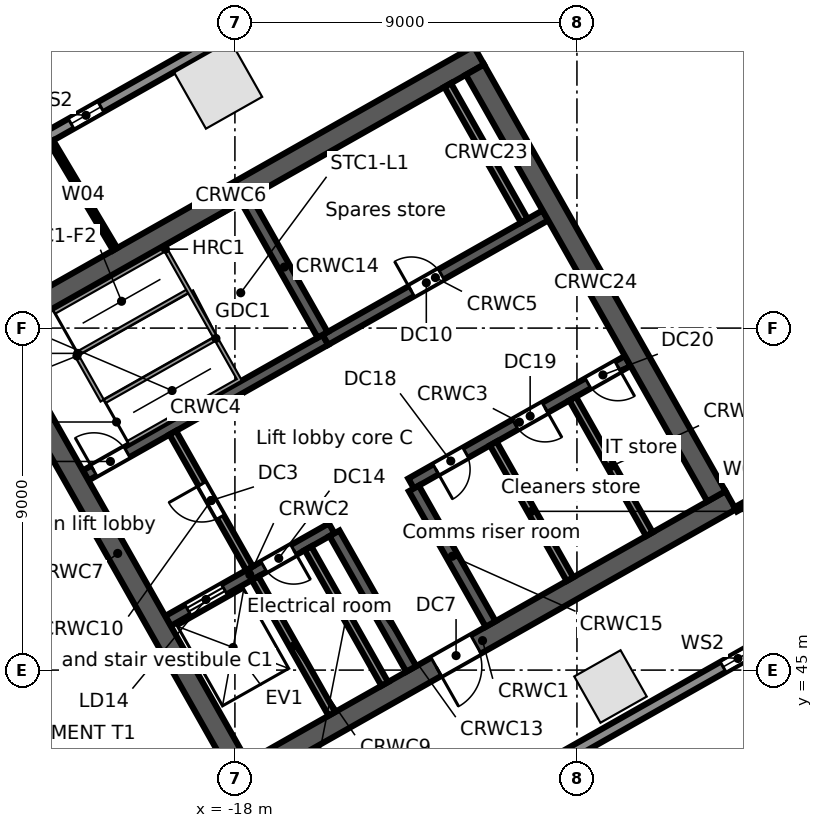
"""IFC4 building model, lengths in metres.
Left out: names, types, materials, properties, quantities, classifications, styles, units other than length and angle.
Written with IfcOpenShell. Run it as: python <this file> out.ifc"""

import sys

from ifc_helpers import new_model, si_unit, direction, frame, frame_2d, origin, origin_2d, place, context, subcontext, project, spatial, rectangle, extrude, element, fill, save


model = new_model("IFC4")
c1 = context("Model", 3, precision=1e-05, world=origin(), true_north=direction((0.0, 1.0)))
c2 = subcontext(c1, "Body", "Model", "MODEL_VIEW")
j1 = project(units=[si_unit("LENGTHUNIT", "METRE"), si_unit("PLANEANGLEUNIT", "RADIAN")], contexts=[c1])
p1 = place(None, origin())
s1 = spatial("IfcSite", under=j1, at=p1, CompositionType="ELEMENT")
p2 = place(p1, origin())
s2 = spatial("IfcBuilding", under=s1, at=p2, CompositionType="ELEMENT")
p3 = place(p2, frame((0.0, 0.0, 145.5)))
s3 = spatial("IfcBuildingStorey", under=s2, at=p3, CompositionType="ELEMENT", Elevation=145.5)
p4 = place(p3, frame((-18.441, 60.406, 0.0), z_axis=(0.0, 0.0, 1.0), x_axis=(-0.87035569594, -0.492423560103, 0.0)))
e1 = element("IfcColumn", 1, at=p4, inside=s3, PredefinedType="COLUMN", context=c2, shape_type="SweptSolid", body=[
    extrude(rectangle(XDim=1.7, YDim=1.7, at=origin_2d()), origin(), (0.0, 0.0, 1.0), 4.4),
])
p5 = place(p3, frame((-8.117, 44.568, 0.0), z_axis=(0.0, 0.0, 1.0), x_axis=(0.87035569594, 0.492423560103, 0.0)))
e2 = element("IfcColumn", 2, at=p5, inside=s3, PredefinedType="COLUMN", context=c2, shape_type="SweptSolid", body=[
    extrude(rectangle(XDim=1.4, YDim=1.4, at=origin_2d()), origin(), (0.0, 0.0, 1.0), 4.4),
])
p6 = place(p3, frame((-58.745, 38.764, 0.0), z_axis=(0.0, 0.0, 1.0), x_axis=(0.870355811726, 0.492423355453, 0.0)))
e3 = element("IfcWall", 3, at=p6, inside=s3, PredefinedType="STANDARD", context=c2, shape_type="SweptSolid", body=[
    extrude(rectangle(XDim=64.025, YDim=0.3, at=frame_2d((32.013, 0.0))), origin(), (0.0, 0.0, 1.0), 4.05),
])
p7 = place(p6, frame((60.122, 0.0, 0.6)))
e4 = element("IfcOpeningElement", 4, at=p7, cuts=e3, PredefinedType="OPENING", context=c2, shape_type="SweptSolid", body=[
    extrude(rectangle(XDim=0.9, YDim=2.8, at=frame_2d((0.45, 1.4))), frame((0.0, 0.16, 0.0), z_axis=(0.0, -1.0, 0.0), x_axis=(1.0, 0.0, 0.0)), (0.0, 0.0, 1.0), 0.32),
])
p8 = place(p6, frame((50.992, 0.0, 0.6)))
e5 = element("IfcOpeningElement", 5, at=p8, cuts=e3, PredefinedType="OPENING", context=c2, shape_type="SweptSolid", body=[
    extrude(rectangle(XDim=0.9, YDim=2.8, at=frame_2d((0.45, 1.4))), frame((0.0, 0.16, 0.0), z_axis=(0.0, -1.0, 0.0), x_axis=(1.0, 0.0, 0.0)), (0.0, 0.0, 1.0), 0.32),
])
p9 = place(p6, frame((41.862, 0.0, 0.6)))
e6 = element("IfcOpeningElement", 6, at=p9, cuts=e3, PredefinedType="OPENING", context=c2, shape_type="SweptSolid", body=[
    extrude(rectangle(XDim=0.9, YDim=2.8, at=frame_2d((0.45, 1.4))), frame((0.0, 0.16, 0.0), z_axis=(0.0, -1.0, 0.0), x_axis=(1.0, 0.0, 0.0)), (0.0, 0.0, 1.0), 0.32),
])
p10 = place(p6, frame((32.732, 0.0, 0.6)))
e7 = element("IfcOpeningElement", 7, at=p10, cuts=e3, PredefinedType="OPENING", context=c2, shape_type="SweptSolid", body=[
    extrude(rectangle(XDim=0.9, YDim=2.8, at=frame_2d((0.45, 1.4))), frame((0.0, 0.16, 0.0), z_axis=(0.0, -1.0, 0.0), x_axis=(1.0, 0.0, 0.0)), (0.0, 0.0, 1.0), 0.32),
])
p11 = place(p6, frame((23.602, 0.0, 0.6)))
e8 = element("IfcOpeningElement", 8, at=p11, cuts=e3, PredefinedType="OPENING", context=c2, shape_type="SweptSolid", body=[
    extrude(rectangle(XDim=0.9, YDim=2.8, at=frame_2d((0.45, 1.4))), frame((0.0, 0.16, 0.0), z_axis=(0.0, -1.0, 0.0), x_axis=(1.0, 0.0, 0.0)), (0.0, 0.0, 1.0), 0.32),
])
p12 = place(p6, frame((14.472, 0.0, 0.6)))
e9 = element("IfcOpeningElement", 9, at=p12, cuts=e3, PredefinedType="OPENING", context=c2, shape_type="SweptSolid", body=[
    extrude(rectangle(XDim=0.9, YDim=2.8, at=frame_2d((0.45, 1.4))), frame((0.0, 0.16, 0.0), z_axis=(0.0, -1.0, 0.0), x_axis=(1.0, 0.0, 0.0)), (0.0, 0.0, 1.0), 0.32),
])
p13 = place(p6, frame((5.342, 0.0, 0.6)))
e10 = element("IfcOpeningElement", 10, at=p13, cuts=e3, PredefinedType="OPENING", context=c2, shape_type="SweptSolid", body=[
    extrude(rectangle(XDim=0.9, YDim=2.8, at=frame_2d((0.45, 1.4))), frame((0.0, 0.16, 0.0), z_axis=(0.0, -1.0, 0.0), x_axis=(1.0, 0.0, 0.0)), (0.0, 0.0, 1.0), 0.32),
])
p14 = place(p3, frame((-0.055, 47.969, 0.0), z_axis=(0.0, 0.0, 1.0), x_axis=(-0.870355730478, -0.492423499058, 0.0)))
e11 = element("IfcWall", 11, at=p14, inside=s3, PredefinedType="STANDARD", context=c2, shape_type="SweptSolid", body=[
    extrude(rectangle(XDim=43.75, YDim=0.3, at=frame_2d((21.875, 0.0))), origin(), (0.0, 0.0, 1.0), 4.05),
])
p15 = place(p14, frame((39.977, 0.0, 0.6)))
e12 = element("IfcOpeningElement", 12, at=p15, cuts=e11, PredefinedType="OPENING", context=c2, shape_type="SweptSolid", body=[
    extrude(rectangle(XDim=0.9, YDim=2.8, at=frame_2d((0.45, 1.4))), frame((0.0, 0.16, 0.0), z_axis=(0.0, -1.0, 0.0), x_axis=(1.0, 0.0, 0.0)), (0.0, 0.0, 1.0), 0.32),
])
p16 = place(p14, frame((31.222, 0.0, 0.6)))
e13 = element("IfcOpeningElement", 13, at=p16, cuts=e11, PredefinedType="OPENING", context=c2, shape_type="SweptSolid", body=[
    extrude(rectangle(XDim=0.9, YDim=2.8, at=frame_2d((0.45, 1.4))), frame((0.0, 0.16, 0.0), z_axis=(0.0, -1.0, 0.0), x_axis=(1.0, 0.0, 0.0)), (0.0, 0.0, 1.0), 0.32),
])
p17 = place(p14, frame((22.468, 0.0, 0.6)))
e14 = element("IfcOpeningElement", 14, at=p17, cuts=e11, PredefinedType="OPENING", context=c2, shape_type="SweptSolid", body=[
    extrude(rectangle(XDim=0.9, YDim=2.8, at=frame_2d((0.45, 1.4))), frame((0.0, 0.16, 0.0), z_axis=(0.0, -1.0, 0.0), x_axis=(1.0, 0.0, 0.0)), (0.0, 0.0, 1.0), 0.32),
])
p18 = place(p14, frame((13.713, 0.0, 0.6)))
e15 = element("IfcOpeningElement", 15, at=p18, cuts=e11, PredefinedType="OPENING", context=c2, shape_type="SweptSolid", body=[
    extrude(rectangle(XDim=0.9, YDim=2.8, at=frame_2d((0.45, 1.4))), frame((0.0, 0.16, 0.0), z_axis=(0.0, -1.0, 0.0), x_axis=(1.0, 0.0, 0.0)), (0.0, 0.0, 1.0), 0.32),
])
p19 = place(p14, frame((4.959, 0.0, 0.6)))
e16 = element("IfcOpeningElement", 16, at=p19, cuts=e11, PredefinedType="OPENING", context=c2, shape_type="SweptSolid", body=[
    extrude(rectangle(XDim=0.9, YDim=2.8, at=frame_2d((0.45, 1.4))), frame((0.0, 0.16, 0.0), z_axis=(0.0, -1.0, 0.0), x_axis=(1.0, 0.0, 0.0)), (0.0, 0.0, 1.0), 0.32),
])
p20 = place(p3, frame((-18.012, 42.083, 0.0), z_axis=(0.0, 0.0, 1.0), x_axis=(0.870360574057, 0.492414937962, 0.0)))
e17 = element("IfcWall", 17, at=p20, inside=s3, PredefinedType="SOLIDWALL", context=c2, shape_type="SweptSolid", body=[
    extrude(rectangle(XDim=15.0, YDim=0.55, at=frame_2d((7.5, 0.0))), origin(), (0.0, 0.0, 1.0), 4.05),
])
p21 = place(p20, frame((6.1, 0.0, 0.0)))
e18 = element("IfcOpeningElement", 18, at=p21, cuts=e17, PredefinedType="OPENING", context=c2, shape_type="SweptSolid", body=[
    extrude(rectangle(XDim=1.2, YDim=2.1, at=frame_2d((0.6, 1.05))), frame((0.0, 0.285, 0.0), z_axis=(0.0, -1.0, 0.0), x_axis=(1.0, 0.0, 0.0)), (0.0, 0.0, 1.0), 0.57),
])
p22 = place(p3, frame((-19.762, 46.292, 0.0), z_axis=(0.0, 0.0, 1.0), x_axis=(0.870359758983, 0.49241637863, 0.0)))
e19 = element("IfcWall", 19, at=p22, inside=s3, PredefinedType="SOLIDWALL", context=c2, shape_type="SweptSolid", body=[
    extrude(rectangle(XDim=4.95, YDim=0.3, at=frame_2d((2.475, 0.0))), origin(), (0.0, 0.0, 1.0), 4.05),
])
p23 = place(p22, frame((0.6, 0.0, 0.0)))
e20 = element("IfcOpeningElement", 20, at=p23, cuts=e19, PredefinedType="OPENING", context=c2, shape_type="SweptSolid", body=[
    extrude(rectangle(XDim=1.1, YDim=2.1, at=frame_2d((0.55, 1.05))), frame((0.0, 0.16, 0.0), z_axis=(0.0, -1.0, 0.0), x_axis=(1.0, 0.0, 0.0)), (0.0, 0.0, 1.0), 0.32),
])
p24 = place(p22, frame((2.9, 0.0, 0.0)))
e21 = element("IfcOpeningElement", 21, at=p24, cuts=e19, PredefinedType="OPENING", context=c2, shape_type="SweptSolid", body=[
    extrude(rectangle(XDim=0.9, YDim=2.1, at=frame_2d((0.45, 1.05))), frame((0.0, 0.16, 0.0), z_axis=(0.0, -1.0, 0.0), x_axis=(1.0, 0.0, 0.0)), (0.0, 0.0, 1.0), 0.32),
])
p25 = place(p3, frame((-13.365, 49.911, 0.0), z_axis=(0.0, 0.0, 1.0), x_axis=(0.870336435567, 0.492457601144, 0.0)))
e22 = element("IfcWall", 22, at=p25, inside=s3, PredefinedType="SOLIDWALL", context=c2, shape_type="SweptSolid", body=[
    extrude(rectangle(XDim=6.55, YDim=0.3, at=frame_2d((3.275, 0.0))), origin(), (0.0, 0.0, 1.0), 4.05),
])
p26 = place(p25, frame((0.75, 0.0, 0.0)))
e23 = element("IfcOpeningElement", 23, at=p26, cuts=e22, PredefinedType="OPENING", context=c2, shape_type="SweptSolid", body=[
    extrude(rectangle(XDim=0.9, YDim=2.1, at=frame_2d((0.45, 1.05))), frame((0.0, 0.16, 0.0), z_axis=(0.0, -1.0, 0.0), x_axis=(1.0, 0.0, 0.0)), (0.0, 0.0, 1.0), 0.32),
])
p27 = place(p25, frame((3.15, 0.0, 0.0)))
e24 = element("IfcOpeningElement", 24, at=p27, cuts=e22, PredefinedType="OPENING", context=c2, shape_type="SweptSolid", body=[
    extrude(rectangle(XDim=0.9, YDim=2.1, at=frame_2d((0.45, 1.05))), frame((0.0, 0.16, 0.0), z_axis=(0.0, -1.0, 0.0), x_axis=(1.0, 0.0, 0.0)), (0.0, 0.0, 1.0), 0.32),
])
p28 = place(p25, frame((5.35, 0.0, 0.0)))
e25 = element("IfcOpeningElement", 25, at=p28, cuts=e22, PredefinedType="OPENING", context=c2, shape_type="SweptSolid", body=[
    extrude(rectangle(XDim=0.9, YDim=2.1, at=frame_2d((0.45, 1.05))), frame((0.0, 0.16, 0.0), z_axis=(0.0, -1.0, 0.0), x_axis=(1.0, 0.0, 0.0)), (0.0, 0.0, 1.0), 0.32),
])
p29 = place(p3, frame((-21.928, 50.121, 0.0), z_axis=(0.0, 0.0, 1.0), x_axis=(0.870340732628, 0.49245000673, 0.0)))
e26 = element("IfcWall", 26, at=p29, inside=s3, PredefinedType="SOLIDWALL", context=c2, shape_type="SweptSolid", body=[
    extrude(rectangle(XDim=7.25, YDim=0.3, at=frame_2d((3.625, 0.0))), origin(), (0.0, 0.0, 1.0), 4.05),
])
p30 = place(p29, frame((0.25, 0.0, 0.0)))
e27 = element("IfcOpeningElement", 27, at=p30, cuts=e26, PredefinedType="OPENING", context=c2, shape_type="SweptSolid", body=[
    extrude(rectangle(XDim=1.0, YDim=2.1, at=frame_2d((0.5, 1.05))), frame((0.0, 0.16, 0.0), z_axis=(0.0, -1.0, 0.0), x_axis=(1.0, 0.0, 0.0)), (0.0, 0.0, 1.0), 0.32),
])
p31 = place(p3, frame((-15.618, 53.691, 0.0), z_axis=(0.0, 0.0, 1.0), x_axis=(0.870367894134, 0.492401999246, 0.0)))
e28 = element("IfcWall", 28, at=p31, inside=s3, PredefinedType="SOLIDWALL", context=c2, shape_type="SweptSolid", body=[
    extrude(rectangle(XDim=6.65, YDim=0.3, at=frame_2d((3.325, 0.0))), origin(), (0.0, 0.0, 1.0), 4.05),
])
p32 = place(p31, frame((2.6, 0.0, 0.0)))
e29 = element("IfcOpeningElement", 29, at=p32, cuts=e28, PredefinedType="OPENING", context=c2, shape_type="SweptSolid", body=[
    extrude(rectangle(XDim=0.9, YDim=2.1, at=frame_2d((0.45, 1.05))), frame((0.0, 0.16, 0.0), z_axis=(0.0, -1.0, 0.0), x_axis=(1.0, 0.0, 0.0)), (0.0, 0.0, 1.0), 0.32),
])
p33 = place(p3, frame((-24.635, 53.789, 0.0), z_axis=(0.0, 0.0, 1.0), x_axis=(0.870360574057, 0.492414937962, 0.0)))
e30 = element("IfcWall", 30, at=p33, inside=s3, PredefinedType="SOLIDWALL", context=c2, shape_type="SweptSolid", body=[
    extrude(rectangle(XDim=15.0, YDim=0.55, at=frame_2d((7.5, 0.0))), origin(), (0.0, 0.0, 1.0), 4.05),
])
p34 = place(p3, frame((-24.26, 53.685, 0.0), z_axis=(0.0, 0.0, 1.0), x_axis=(0.492427022044, -0.870353737259, 0.0)))
e31 = element("IfcWall", 31, at=p34, inside=s3, PredefinedType="SOLIDWALL", context=c2, shape_type="SweptSolid", body=[
    extrude(rectangle(XDim=12.9, YDim=0.55, at=frame_2d((6.45, 0.0))), origin(), (0.0, 0.0, 1.0), 4.05),
])
p35 = place(p3, frame((-17.469, 47.417, 0.0), z_axis=(0.0, 0.0, 1.0), x_axis=(0.492453559952, -0.87033872216, 0.0)))
e32 = element("IfcWall", 32, at=p35, inside=s3, PredefinedType="SOLIDWALL", context=c2, shape_type="SweptSolid", body=[
    extrude(rectangle(XDim=4.1, YDim=0.2, at=frame_2d((2.05, 0.0))), origin(), (0.0, 0.0, 1.0), 4.05),
])
p36 = place(p3, frame((-19.635, 51.246, 0.0), z_axis=(0.0, 0.0, 1.0), x_axis=(0.492408451753, -0.87036424366, 0.0)))
e33 = element("IfcWall", 33, at=p36, inside=s3, PredefinedType="PARTITIONING", context=c2, shape_type="SweptSolid", body=[
    extrude(rectangle(XDim=4.1, YDim=0.2, at=frame_2d((2.05, 0.0))), origin(), (0.0, 0.0, 1.0), 4.05),
])
p37 = place(p36, frame((1.55, 0.0, 0.0)))
e34 = element("IfcOpeningElement", 34, at=p37, cuts=e33, PredefinedType="OPENING", context=c2, shape_type="SweptSolid", body=[
    extrude(rectangle(XDim=1.0, YDim=2.1, at=frame_2d((0.5, 1.05))), frame((0.0, 0.11, 0.0), z_axis=(0.0, -1.0, 0.0), x_axis=(1.0, 0.0, 0.0)), (0.0, 0.0, 1.0), 0.22),
])
p38 = place(p3, frame((-16.076, 48.205, 0.0), z_axis=(0.0, 0.0, 1.0), x_axis=(0.492408451753, -0.87036424366, 0.0)))
e35 = element("IfcWall", 35, at=p38, inside=s3, PredefinedType="SOLIDWALL", context=c2, shape_type="SweptSolid", body=[
    extrude(rectangle(XDim=4.1, YDim=0.2, at=frame_2d((2.05, 0.0))), origin(), (0.0, 0.0, 1.0), 4.05),
])
for number, where, z_axis, x_axis in (
    (36, (-15.379, 48.599, 0.0), (0.0, 0.0, 1.0), (0.492, -0.87, 0.0)),
    (37, (-17.711, 57.39, 0.0), (0.0, 0.0, 1.0), (0.492, -0.87, 0.0)),
):
    element("IfcWall", number, at=place(p3, frame(where, z_axis=z_axis, x_axis=x_axis)), inside=s3, PredefinedType="SOLIDWALL", context=c2, shape_type="SweptSolid", body=[
        extrude(rectangle(XDim=4.1, YDim=0.3, at=frame_2d((2.05, 0.0))), origin(), (0.0, 0.0, 1.0), 4.05),
    ])
p39 = place(p3, frame((-13.291, 49.781, 0.0), z_axis=(0.0, 0.0, 1.0), x_axis=(0.492382931784, -0.870378681085, 0.0)))
e38 = element("IfcWall", 38, at=p39, inside=s3, PredefinedType="SOLIDWALL", context=c2, shape_type="SweptSolid", body=[
    extrude(rectangle(XDim=4.1, YDim=0.3, at=frame_2d((2.05, 0.0))), origin(), (0.0, 0.0, 1.0), 4.05),
])
p40 = place(p3, frame((-11.202, 50.962, 0.0), z_axis=(0.0, 0.0, 1.0), x_axis=(0.492428039142, -0.870353161807, 0.0)))
e39 = element("IfcWall", 39, at=p40, inside=s3, PredefinedType="PARTITIONING", context=c2, shape_type="SweptSolid", body=[
    extrude(rectangle(XDim=4.1, YDim=0.2, at=frame_2d((2.05, 0.0))), origin(), (0.0, 0.0, 1.0), 4.05),
])
p41 = place(p3, frame((-9.113, 52.144, 0.0), z_axis=(0.0, 0.0, 1.0), x_axis=(0.492408451753, -0.87036424366, 0.0)))
e40 = element("IfcWall", 40, at=p41, inside=s3, PredefinedType="PARTITIONING", context=c2, shape_type="SweptSolid", body=[
    extrude(rectangle(XDim=4.1, YDim=0.2, at=frame_2d((2.05, 0.0))), origin(), (0.0, 0.0, 1.0), 4.05),
])
p42 = place(p3, frame((-12.402, 60.394, 0.0), z_axis=(0.0, 0.0, 1.0), x_axis=(0.492453559952, -0.87033872216, 0.0)))
e41 = element("IfcWall", 41, at=p42, inside=s3, PredefinedType="SOLIDWALL", context=c2, shape_type="SweptSolid", body=[
    extrude(rectangle(XDim=4.1, YDim=0.2, at=frame_2d((2.05, 0.0))), origin(), (0.0, 0.0, 1.0), 4.05),
])
p43 = place(p3, frame((-11.684, 60.8, 0.0), z_axis=(0.0, 0.0, 1.0), x_axis=(0.492427022044, -0.870353737259, 0.0)))
e42 = element("IfcWall", 42, at=p43, inside=s3, PredefinedType="SOLIDWALL", context=c2, shape_type="SweptSolid", body=[
    extrude(rectangle(XDim=12.9, YDim=0.55, at=frame_2d((6.45, 0.0))), origin(), (0.0, 0.0, 1.0), 4.05),
])
p44 = place(p3, frame((-22.835, 58.908, 0.0), z_axis=(0.0, 0.0, 1.0), x_axis=(0.511113859879, -0.859513014584, 0.0)))
e43 = element("IfcWall", 43, at=p44, inside=s3, PredefinedType="PARTITIONING", context=c2, shape_type="SweptSolid", body=[
    extrude(rectangle(XDim=3.295, YDim=0.125, at=frame_2d((1.647, 0.0))), origin(), (0.0, 0.0, 1.0), 3.23),
])
p45 = place(p3, frame((-4.821, 49.23, 0.0), z_axis=(0.0, 0.0, 1.0), x_axis=(0.870371217631, 0.492396124598, 0.0)))
e44 = element("IfcWall", 44, at=p45, inside=s3, PredefinedType="PARTITIONING", context=c2, shape_type="SweptSolid", body=[
    extrude(rectangle(XDim=2.659, YDim=0.125, at=frame_2d((1.329, 0.0))), origin(), (0.0, 0.0, 1.0), 4.05),
])
p46 = place(p9, origin())
e45 = element("IfcWindow", 45, at=p46, inside=s3, PartitioningType="SINGLE_PANEL", PredefinedType="WINDOW", context=c2, shape_type="SweptSolid", body=[
    extrude(rectangle(XDim=0.9, YDim=2.8, at=frame_2d((0.45, 1.4))), frame((0.0, 0.03, 0.0), z_axis=(0.0, -1.0, 0.0), x_axis=(1.0, 0.0, 0.0)), (0.0, 0.0, 1.0), 0.06),
])
fill(e6, e45)
p47 = place(p19, origin())
e46 = element("IfcWindow", 46, at=p47, inside=s3, PartitioningType="SINGLE_PANEL", PredefinedType="WINDOW", context=c2, shape_type="SweptSolid", body=[
    extrude(rectangle(XDim=0.9, YDim=2.8, at=frame_2d((0.45, 1.4))), frame((0.0, 0.03, 0.0), z_axis=(0.0, -1.0, 0.0), x_axis=(1.0, 0.0, 0.0)), (0.0, 0.0, 1.0), 0.06),
])
fill(e16, e46)
p48 = place(p23, origin())
e47 = element("IfcDoor", 47, at=p48, inside=s3, OperationType="DOUBLE_DOOR_SLIDING", PredefinedType="DOOR", context=c2, shape_type="SweptSolid", body=[
    extrude(rectangle(XDim=1.1, YDim=2.1, at=frame_2d((0.55, 1.05))), frame((0.0, 0.025, 0.0), z_axis=(0.0, -1.0, 0.0), x_axis=(1.0, 0.0, 0.0)), (0.0, 0.0, 1.0), 0.05),
])
fill(e20, e47)
p49 = place(p30, origin())
e48 = element("IfcDoor", 48, at=p49, inside=s3, OperationType="SINGLE_SWING_LEFT", PredefinedType="DOOR", context=c2, shape_type="SweptSolid", body=[
    extrude(rectangle(XDim=1.0, YDim=2.1, at=frame_2d((0.5, 1.05))), frame((0.0, 0.025, 0.0), z_axis=(0.0, -1.0, 0.0), x_axis=(1.0, 0.0, 0.0)), (0.0, 0.0, 1.0), 0.05),
])
fill(e27, e48)
p50 = place(p37, frame((1.0, 0.0, 0.0), z_axis=(0.0, 0.0, 1.0), x_axis=(-1.0, 0.0, 0.0)))
e49 = element("IfcDoor", 49, at=p50, inside=s3, OperationType="SINGLE_SWING_RIGHT", PredefinedType="DOOR", context=c2, shape_type="SweptSolid", body=[
    extrude(rectangle(XDim=1.0, YDim=2.1, at=frame_2d((0.5, 1.05))), frame((0.0, 0.025, 0.0), z_axis=(0.0, -1.0, 0.0), x_axis=(1.0, 0.0, 0.0)), (0.0, 0.0, 1.0), 0.05),
])
fill(e34, e49)
p51 = place(p21, frame((1.2, 0.0, 0.0), z_axis=(0.0, 0.0, 1.0), x_axis=(-1.0, 0.0, 0.0)))
e50 = element("IfcDoor", 50, at=p51, inside=s3, OperationType="SINGLE_SWING_RIGHT", PredefinedType="DOOR", context=c2, shape_type="SweptSolid", body=[
    extrude(rectangle(XDim=1.2, YDim=2.1, at=frame_2d((0.6, 1.05))), frame((0.0, 0.025, 0.0), z_axis=(0.0, -1.0, 0.0), x_axis=(1.0, 0.0, 0.0)), (0.0, 0.0, 1.0), 0.05),
])
fill(e18, e50)
p52 = place(p32, origin())
e51 = element("IfcDoor", 51, at=p52, inside=s3, OperationType="SINGLE_SWING_LEFT", PredefinedType="DOOR", context=c2, shape_type="SweptSolid", body=[
    extrude(rectangle(XDim=0.9, YDim=2.1, at=frame_2d((0.45, 1.05))), frame((0.0, 0.025, 0.0), z_axis=(0.0, -1.0, 0.0), x_axis=(1.0, 0.0, 0.0)), (0.0, 0.0, 1.0), 0.05),
])
fill(e29, e51)
p53 = place(p24, frame((0.9, 0.0, 0.0), z_axis=(0.0, 0.0, 1.0), x_axis=(-1.0, 0.0, 0.0)))
e52 = element("IfcDoor", 52, at=p53, inside=s3, OperationType="SINGLE_SWING_LEFT", PredefinedType="DOOR", context=c2, shape_type="SweptSolid", body=[
    extrude(rectangle(XDim=0.9, YDim=2.1, at=frame_2d((0.45, 1.05))), frame((0.0, 0.025, 0.0), z_axis=(0.0, -1.0, 0.0), x_axis=(1.0, 0.0, 0.0)), (0.0, 0.0, 1.0), 0.05),
])
fill(e21, e52)
p54 = place(p26, frame((0.9, 0.0, 0.0), z_axis=(0.0, 0.0, 1.0), x_axis=(-1.0, 0.0, 0.0)))
e53 = element("IfcDoor", 53, at=p54, inside=s3, OperationType="SINGLE_SWING_RIGHT", PredefinedType="DOOR", context=c2, shape_type="SweptSolid", body=[
    extrude(rectangle(XDim=0.9, YDim=2.1, at=frame_2d((0.45, 1.05))), frame((0.0, 0.025, 0.0), z_axis=(0.0, -1.0, 0.0), x_axis=(1.0, 0.0, 0.0)), (0.0, 0.0, 1.0), 0.05),
])
fill(e23, e53)
p55 = place(p27, frame((0.9, 0.0, 0.0), z_axis=(0.0, 0.0, 1.0), x_axis=(-1.0, 0.0, 0.0)))
e54 = element("IfcDoor", 54, at=p55, inside=s3, OperationType="SINGLE_SWING_LEFT", PredefinedType="DOOR", context=c2, shape_type="SweptSolid", body=[
    extrude(rectangle(XDim=0.9, YDim=2.1, at=frame_2d((0.45, 1.05))), frame((0.0, 0.025, 0.0), z_axis=(0.0, -1.0, 0.0), x_axis=(1.0, 0.0, 0.0)), (0.0, 0.0, 1.0), 0.05),
])
fill(e24, e54)
p56 = place(p28, frame((0.9, 0.0, 0.0), z_axis=(0.0, 0.0, 1.0), x_axis=(-1.0, 0.0, 0.0)))
e55 = element("IfcDoor", 55, at=p56, inside=s3, OperationType="SINGLE_SWING_LEFT", PredefinedType="DOOR", context=c2, shape_type="SweptSolid", body=[
    extrude(rectangle(XDim=0.9, YDim=2.1, at=frame_2d((0.45, 1.05))), frame((0.0, 0.025, 0.0), z_axis=(0.0, -1.0, 0.0), x_axis=(1.0, 0.0, 0.0)), (0.0, 0.0, 1.0), 0.05),
])
fill(e25, e55)
save(model, sys.argv[1])
